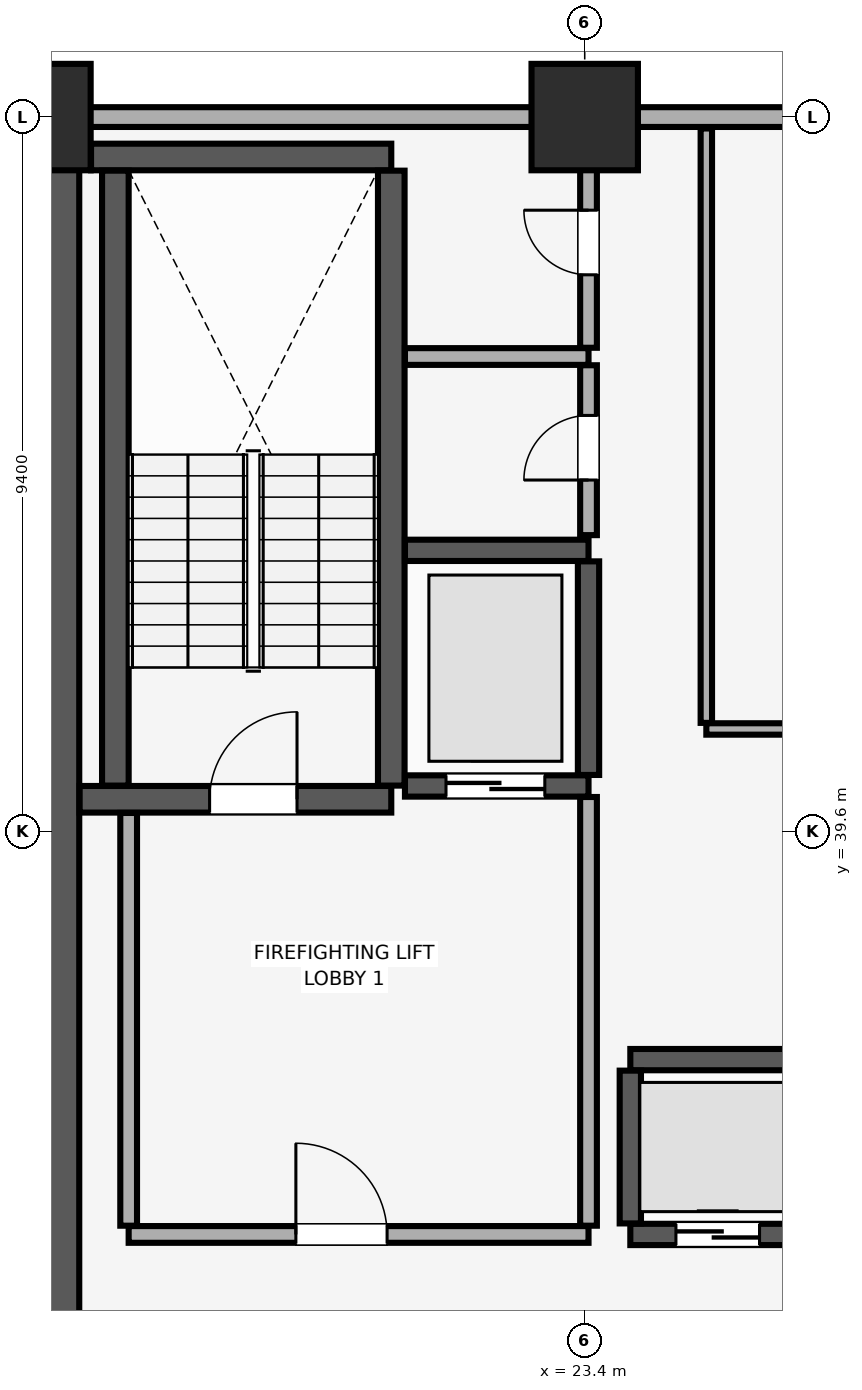
"""IFC4 building model, lengths in metres.
Left out: names, types, materials, properties, quantities, classifications, styles, units other than length and angle.
Written with IfcOpenShell. Run it as: python <this file> out.ifc"""

import sys

from ifc_helpers import new_model, si_unit, direction, frame, frame_2d, origin, origin_2d, place, context, subcontext, project, spatial, rectangle, extrude, element, fill, save


model = new_model("IFC4")
c1 = context("Model", 3, precision=1e-05, world=origin(), true_north=direction((0.0, 1.0)))
c2 = subcontext(c1, "Body", "Model", "MODEL_VIEW")
j1 = project(units=[si_unit("LENGTHUNIT", "METRE"), si_unit("PLANEANGLEUNIT", "RADIAN")], contexts=[c1])
p1 = place(None, origin())
s1 = spatial("IfcSite", under=j1, at=p1, CompositionType="ELEMENT")
p2 = place(p1, origin())
s2 = spatial("IfcBuilding", under=s1, at=p2, CompositionType="ELEMENT")
p3 = place(p2, frame((0.0, 0.0, 35.15)))
s3 = spatial("IfcBuildingStorey", under=s2, at=p3, CompositionType="ELEMENT", Elevation=35.15)
for number, where, z_axis, x_axis in (
    (1, (16.2, 49.0, 0.0), (0.0, 0.0, 1.0), (1.0, 0.0, 0.0)),
    (2, (23.4, 49.0, 0.0), (0.0, 0.0, 1.0), (1.0, 0.0, 0.0)),
):
    element("IfcColumn", number, at=place(p3, frame(where, z_axis=z_axis, x_axis=x_axis)), inside=s3, PredefinedType="COLUMN", context=c2, shape_type="SweptSolid", body=[
        extrude(rectangle(XDim=1.4, YDim=1.4, at=origin_2d()), origin(), (0.0, 0.0, 1.0), 3.51),
    ])
p4 = place(p3, frame((79.8, 49.0, 0.0), z_axis=(0.0, 0.0, 1.0), x_axis=(-1.0, 0.0, 0.0)))
e3 = element("IfcWall", 3, at=p4, inside=s3, PredefinedType="SOLIDWALL", context=c2, shape_type="SweptSolid", body=[
    extrude(rectangle(XDim=75.6, YDim=0.26, at=frame_2d((37.8, 0.0))), origin(), (0.0, 0.0, 1.0), 2.56),
])
p5 = place(p4, frame((72.565, 0.0, 0.85)))
e4 = element("IfcOpeningElement", 4, at=p5, cuts=e3, PredefinedType="OPENING", context=c2, shape_type="SweptSolid", body=[
    extrude(rectangle(XDim=1.5, YDim=1.4, at=frame_2d((0.75, 0.7))), frame((0.0, 0.14, 0.0), z_axis=(0.0, -1.0, 0.0), x_axis=(1.0, 0.0, 0.0)), (0.0, 0.0, 1.0), 0.28),
])
p6 = place(p4, frame((67.45, 0.0, 0.85)))
e5 = element("IfcOpeningElement", 5, at=p6, cuts=e3, PredefinedType="OPENING", context=c2, shape_type="SweptSolid", body=[
    extrude(rectangle(XDim=1.5, YDim=1.4, at=frame_2d((0.75, 0.7))), frame((0.0, 0.14, 0.0), z_axis=(0.0, -1.0, 0.0), x_axis=(1.0, 0.0, 0.0)), (0.0, 0.0, 1.0), 0.28),
])
p7 = place(p4, frame((6.65, 0.0, 0.85)))
e6 = element("IfcOpeningElement", 6, at=p7, cuts=e3, PredefinedType="OPENING", context=c2, shape_type="SweptSolid", body=[
    extrude(rectangle(XDim=1.5, YDim=1.4, at=frame_2d((0.75, 0.7))), frame((0.0, 0.14, 0.0), z_axis=(0.0, -1.0, 0.0), x_axis=(1.0, 0.0, 0.0)), (0.0, 0.0, 1.0), 0.28),
])
p8 = place(p4, frame((1.535, 0.0, 0.85)))
e7 = element("IfcOpeningElement", 7, at=p8, cuts=e3, PredefinedType="OPENING", context=c2, shape_type="SweptSolid", body=[
    extrude(rectangle(XDim=1.5, YDim=1.4, at=frame_2d((0.75, 0.7))), frame((0.0, 0.14, 0.0), z_axis=(0.0, -1.0, 0.0), x_axis=(1.0, 0.0, 0.0)), (0.0, 0.0, 1.0), 0.28),
])
p9 = place(p4, frame((51.365, 0.0, 0.9)))
e8 = element("IfcOpeningElement", 8, at=p9, cuts=e3, PredefinedType="OPENING", context=c2, shape_type="SweptSolid", body=[
    extrude(rectangle(XDim=1.5, YDim=1.4, at=frame_2d((0.75, 0.7))), frame((0.0, 0.14, 0.0), z_axis=(0.0, -1.0, 0.0), x_axis=(1.0, 0.0, 0.0)), (0.0, 0.0, 1.0), 0.28),
])
p10 = place(p4, frame((46.0, 0.0, 0.9)))
e9 = element("IfcOpeningElement", 9, at=p10, cuts=e3, PredefinedType="OPENING", context=c2, shape_type="SweptSolid", body=[
    extrude(rectangle(XDim=1.5, YDim=1.4, at=frame_2d((0.75, 0.7))), frame((0.0, 0.14, 0.0), z_axis=(0.0, -1.0, 0.0), x_axis=(1.0, 0.0, 0.0)), (0.0, 0.0, 1.0), 0.28),
])
p11 = place(p4, frame((29.15, 0.0, 0.9)))
e10 = element("IfcOpeningElement", 10, at=p11, cuts=e3, PredefinedType="OPENING", context=c2, shape_type="SweptSolid", body=[
    extrude(rectangle(XDim=1.5, YDim=1.4, at=frame_2d((0.75, 0.7))), frame((0.0, 0.14, 0.0), z_axis=(0.0, -1.0, 0.0), x_axis=(1.0, 0.0, 0.0)), (0.0, 0.0, 1.0), 0.28),
])
p12 = place(p4, frame((23.485, 0.0, 0.9)))
e11 = element("IfcOpeningElement", 11, at=p12, cuts=e3, PredefinedType="OPENING", context=c2, shape_type="SweptSolid", body=[
    extrude(rectangle(XDim=1.5, YDim=1.4, at=frame_2d((0.75, 0.7))), frame((0.0, 0.14, 0.0), z_axis=(0.0, -1.0, 0.0), x_axis=(1.0, 0.0, 0.0)), (0.0, 0.0, 1.0), 0.28),
])
p13 = place(p3, frame((16.2, 29.4, 0.0), z_axis=(0.0, 0.0, 1.0), x_axis=(0.0, 1.0, 0.0)))
e12 = element("IfcWall", 12, at=p13, inside=s3, PredefinedType="SHEAR", context=c2, shape_type="SweptSolid", body=[
    extrude(rectangle(XDim=19.2, YDim=1.1, at=frame_2d((9.6, 0.0))), origin(), (0.0, 0.0, 1.0), 3.51),
])
p14 = place(p3, frame((16.755, 40.025, 0.0), z_axis=(0.0, 0.0, 1.0), x_axis=(1.0, 0.0, 0.0)))
e13 = element("IfcWall", 13, at=p14, inside=s3, PredefinedType="SHEAR", context=c2, shape_type="SweptSolid", body=[
    extrude(rectangle(XDim=4.1, YDim=0.35, at=frame_2d((2.05, 0.0))), origin(), (0.0, 0.0, 1.0), 3.51),
])
p15 = place(p14, frame((1.71, 0.0, 0.0)))
e14 = element("IfcOpeningElement", 14, at=p15, cuts=e13, PredefinedType="OPENING", context=c2, shape_type="SweptSolid", body=[
    extrude(rectangle(XDim=1.15, YDim=2.15, at=frame_2d((0.575, 1.075))), frame((0.0, 0.185, 0.0), z_axis=(0.0, -1.0, 0.0), x_axis=(1.0, 0.0, 0.0)), (0.0, 0.0, 1.0), 0.37),
])
p16 = place(p3, frame((16.905, 48.475, 0.0), z_axis=(0.0, 0.0, 1.0), x_axis=(1.0, 0.0, 0.0)))
e15 = element("IfcWall", 15, at=p16, inside=s3, PredefinedType="SHEAR", context=c2, shape_type="SweptSolid", body=[
    extrude(rectangle(XDim=3.95, YDim=0.35, at=frame_2d((1.975, 0.0))), origin(), (0.0, 0.0, 1.0), 3.51),
])
for number, where, z_axis, x_axis in (
    (16, (17.225, 40.205, 0.0), (0.0, 0.0, 1.0), (0.0, 1.0, 0.0)),
    (17, (20.855, 40.205, 0.0), (0.0, 0.0, 1.0), (0.0, 1.0, 0.0)),
):
    element("IfcWall", number, at=place(p3, frame(where, z_axis=z_axis, x_axis=x_axis)), inside=s3, PredefinedType="SHEAR", context=c2, shape_type="SweptSolid", body=[
        extrude(rectangle(XDim=8.09, YDim=0.35, at=frame_2d((4.045, 0.0))), origin(), (0.0, 0.0, 1.0), 3.51),
    ])
p17 = place(p3, frame((24.0, 34.3, 0.0), z_axis=(0.0, 0.0, 1.0), x_axis=(1.0, 0.0, 0.0)))
e18 = element("IfcWall", 18, at=p17, inside=s3, PredefinedType="SHEAR", context=c2, shape_type="SweptSolid", body=[
    extrude(rectangle(XDim=2.3, YDim=0.28, at=frame_2d((1.15, 0.0))), origin(), (0.0, 0.0, 1.0), 3.51),
])
p18 = place(p17, frame((0.6, 0.0, 0.0)))
e19 = element("IfcOpeningElement", 19, at=p18, cuts=e18, PredefinedType="OPENING", context=c2, shape_type="SweptSolid", body=[
    extrude(rectangle(XDim=1.1, YDim=2.2, at=frame_2d((0.55, 1.1))), frame((0.0, 0.15, 0.0), z_axis=(0.0, -1.0, 0.0), x_axis=(1.0, 0.0, 0.0)), (0.0, 0.0, 1.0), 0.3),
])
p19 = place(p3, frame((24.0, 36.6, 0.0), z_axis=(0.0, 0.0, 1.0), x_axis=(1.0, 0.0, 0.0)))
e20 = element("IfcWall", 20, at=p19, inside=s3, PredefinedType="SHEAR", context=c2, shape_type="SweptSolid", body=[
    extrude(rectangle(XDim=2.3, YDim=0.28, at=frame_2d((1.15, 0.0))), origin(), (0.0, 0.0, 1.0), 3.51),
])
p20 = place(p3, frame((24.0, 34.445, 0.0), z_axis=(0.0, 0.0, 1.0), x_axis=(0.0, 1.0, 0.0)))
e21 = element("IfcWall", 21, at=p20, inside=s3, PredefinedType="SHEAR", context=c2, shape_type="SweptSolid", body=[
    extrude(rectangle(XDim=2.01, YDim=0.28, at=frame_2d((1.005, 0.0))), origin(), (0.0, 0.0, 1.0), 3.51),
])
p21 = place(p3, frame((21.035, 40.2, 0.0), z_axis=(0.0, 0.0, 1.0), x_axis=(1.0, 0.0, 0.0)))
e22 = element("IfcWall", 22, at=p21, inside=s3, PredefinedType="SHEAR", context=c2, shape_type="SweptSolid", body=[
    extrude(rectangle(XDim=2.415, YDim=0.28, at=frame_2d((1.208, 0.0))), origin(), (0.0, 0.0, 1.0), 3.51),
])
p22 = place(p21, frame((0.54, 0.0, 0.0)))
e23 = element("IfcOpeningElement", 23, at=p22, cuts=e22, PredefinedType="OPENING", context=c2, shape_type="SweptSolid", body=[
    extrude(rectangle(XDim=1.3, YDim=2.3, at=frame_2d((0.65, 1.15))), frame((0.0, 0.15, 0.0), z_axis=(0.0, -1.0, 0.0), x_axis=(1.0, 0.0, 0.0)), (0.0, 0.0, 1.0), 0.3),
])
p23 = place(p3, frame((21.035, 43.3, 0.0), z_axis=(0.0, 0.0, 1.0), x_axis=(1.0, 0.0, 0.0)))
e24 = element("IfcWall", 24, at=p23, inside=s3, PredefinedType="SHEAR", context=c2, shape_type="SweptSolid", body=[
    extrude(rectangle(XDim=2.415, YDim=0.28, at=frame_2d((1.208, 0.0))), origin(), (0.0, 0.0, 1.0), 3.51),
])
p24 = place(p3, frame((23.45, 40.345, 0.0), z_axis=(0.0, 0.0, 1.0), x_axis=(0.0, 1.0, 0.0)))
e25 = element("IfcWall", 25, at=p24, inside=s3, PredefinedType="SHEAR", context=c2, shape_type="SweptSolid", body=[
    extrude(rectangle(XDim=2.81, YDim=0.28, at=frame_2d((1.405, 0.0))), origin(), (0.0, 0.0, 1.0), 3.51),
])
p25 = place(p3, frame((17.4, 34.3, 0.0), z_axis=(0.0, 0.0, 1.0), x_axis=(1.0, 0.0, 0.0)))
e26 = element("IfcWall", 26, at=p25, inside=s3, PredefinedType="PARTITIONING", context=c2, shape_type="SweptSolid", body=[
    extrude(rectangle(XDim=6.05, YDim=0.22, at=frame_2d((3.025, 0.0))), origin(), (0.0, 0.0, 1.0), 3.51),
])
p26 = place(p25, frame((2.2, 0.0, 0.0)))
e27 = element("IfcOpeningElement", 27, at=p26, cuts=e26, PredefinedType="OPENING", context=c2, shape_type="SweptSolid", body=[
    extrude(rectangle(XDim=1.2, YDim=2.15, at=frame_2d((0.6, 1.075))), frame((0.0, 0.12, 0.0), z_axis=(0.0, -1.0, 0.0), x_axis=(1.0, 0.0, 0.0)), (0.0, 0.0, 1.0), 0.24),
])
p27 = place(p3, frame((17.4, 34.415, 0.0), z_axis=(0.0, 0.0, 1.0), x_axis=(0.0, 1.0, 0.0)))
e28 = element("IfcWall", 28, at=p27, inside=s3, PredefinedType="PARTITIONING", context=c2, shape_type="SweptSolid", body=[
    extrude(rectangle(XDim=5.43, YDim=0.22, at=frame_2d((2.715, 0.0))), origin(), (0.0, 0.0, 1.0), 3.51),
])
p28 = place(p3, frame((23.45, 34.415, 0.0), z_axis=(0.0, 0.0, 1.0), x_axis=(0.0, 1.0, 0.0)))
e29 = element("IfcWall", 29, at=p28, inside=s3, PredefinedType="PARTITIONING", context=c2, shape_type="SweptSolid", body=[
    extrude(rectangle(XDim=5.64, YDim=0.22, at=frame_2d((2.82, 0.0))), origin(), (0.0, 0.0, 1.0), 3.51),
])
p29 = place(p3, frame((21.035, 45.85, 0.0), z_axis=(0.0, 0.0, 1.0), x_axis=(1.0, 0.0, 0.0)))
e30 = element("IfcWall", 30, at=p29, inside=s3, PredefinedType="PARTITIONING", context=c2, shape_type="SweptSolid", body=[
    extrude(rectangle(XDim=2.415, YDim=0.22, at=frame_2d((1.208, 0.0))), origin(), (0.0, 0.0, 1.0), 3.51),
])
p30 = place(p3, frame((23.45, 43.5, 0.0), z_axis=(0.0, 0.0, 1.0), x_axis=(0.0, 1.0, 0.0)))
e31 = element("IfcWall", 31, at=p30, inside=s3, PredefinedType="PARTITIONING", context=c2, shape_type="SweptSolid", body=[
    extrude(rectangle(XDim=2.235, YDim=0.22, at=frame_2d((1.118, 0.0))), origin(), (0.0, 0.0, 1.0), 3.51),
])
p31 = place(p30, frame((0.725, 0.0, 0.0)))
e32 = element("IfcOpeningElement", 32, at=p31, cuts=e31, PredefinedType="OPENING", context=c2, shape_type="SweptSolid", body=[
    extrude(rectangle(XDim=0.85, YDim=2.1, at=frame_2d((0.425, 1.05))), frame((0.0, 0.12, 0.0), z_axis=(0.0, -1.0, 0.0), x_axis=(1.0, 0.0, 0.0)), (0.0, 0.0, 1.0), 0.24),
])
p32 = place(p3, frame((23.45, 45.965, 0.0), z_axis=(0.0, 0.0, 1.0), x_axis=(0.0, 1.0, 0.0)))
e33 = element("IfcWall", 33, at=p32, inside=s3, PredefinedType="PARTITIONING", context=c2, shape_type="SweptSolid", body=[
    extrude(rectangle(XDim=2.885, YDim=0.22, at=frame_2d((1.442, 0.0))), origin(), (0.0, 0.0, 1.0), 3.51),
])
p33 = place(p32, frame((0.96, 0.0, 0.0)))
e34 = element("IfcOpeningElement", 34, at=p33, cuts=e33, PredefinedType="OPENING", context=c2, shape_type="SweptSolid", body=[
    extrude(rectangle(XDim=0.85, YDim=2.1, at=frame_2d((0.425, 1.05))), frame((0.0, 0.12, 0.0), z_axis=(0.0, -1.0, 0.0), x_axis=(1.0, 0.0, 0.0)), (0.0, 0.0, 1.0), 0.24),
])
p34 = place(p3, frame((25.0, 40.95, 0.0), z_axis=(0.0, 0.0, 1.0), x_axis=(1.0, 0.0, 0.0)))
e35 = element("IfcWall", 35, at=p34, inside=s3, PredefinedType="PARTITIONING", context=c2, shape_type="SweptSolid", body=[
    extrude(rectangle(XDim=5.2, YDim=0.15, at=frame_2d((2.6, 0.0))), origin(), (0.0, 0.0, 1.0), 3.51),
])
p35 = place(p34, frame((2.175, 0.0, 0.0)))
e36 = element("IfcOpeningElement", 36, at=p35, cuts=e35, PredefinedType="OPENING", context=c2, shape_type="SweptSolid", body=[
    extrude(rectangle(XDim=0.85, YDim=2.1, at=frame_2d((0.425, 1.05))), frame((0.0, 0.085, 0.0), z_axis=(0.0, -1.0, 0.0), x_axis=(1.0, 0.0, 0.0)), (0.0, 0.0, 1.0), 0.17),
])
p36 = place(p3, frame((25.0, 41.03, 0.0), z_axis=(0.0, 0.0, 1.0), x_axis=(0.0, 1.0, 0.0)))
e37 = element("IfcWall", 37, at=p36, inside=s3, PredefinedType="PARTITIONING", context=c2, shape_type="SweptSolid", body=[
    extrude(rectangle(XDim=7.82, YDim=0.15, at=frame_2d((3.91, 0.0))), origin(), (0.0, 0.0, 1.0), 3.51),
])
p37 = place(p15, origin())
e38 = element("IfcDoor", 38, at=p37, inside=s3, OperationType="SINGLE_SWING_RIGHT", PredefinedType="DOOR", context=c2, shape_type="SweptSolid", body=[
    extrude(rectangle(XDim=1.15, YDim=2.15, at=frame_2d((0.575, 1.075))), frame((0.0, 0.025, 0.0), z_axis=(0.0, -1.0, 0.0), x_axis=(1.0, 0.0, 0.0)), (0.0, 0.0, 1.0), 0.05),
])
fill(e14, e38)
p38 = place(p18, origin())
e39 = element("IfcDoor", 39, at=p38, inside=s3, OperationType="DOUBLE_DOOR_SLIDING", PredefinedType="DOOR", context=c2, shape_type="SweptSolid", body=[
    extrude(rectangle(XDim=1.1, YDim=2.2, at=frame_2d((0.55, 1.1))), frame((0.0, 0.025, 0.0), z_axis=(0.0, -1.0, 0.0), x_axis=(1.0, 0.0, 0.0)), (0.0, 0.0, 1.0), 0.05),
])
fill(e19, e39)
p39 = place(p22, origin())
e40 = element("IfcDoor", 40, at=p39, inside=s3, OperationType="DOUBLE_DOOR_SLIDING", PredefinedType="DOOR", context=c2, shape_type="SweptSolid", body=[
    extrude(rectangle(XDim=1.3, YDim=2.3, at=frame_2d((0.65, 1.15))), frame((0.0, 0.025, 0.0), z_axis=(0.0, -1.0, 0.0), x_axis=(1.0, 0.0, 0.0)), (0.0, 0.0, 1.0), 0.05),
])
fill(e23, e40)
p40 = place(p26, origin())
e41 = element("IfcDoor", 41, at=p40, inside=s3, OperationType="SINGLE_SWING_LEFT", PredefinedType="DOOR", context=c2, shape_type="SweptSolid", body=[
    extrude(rectangle(XDim=1.2, YDim=2.15, at=frame_2d((0.6, 1.075))), frame((0.0, 0.025, 0.0), z_axis=(0.0, -1.0, 0.0), x_axis=(1.0, 0.0, 0.0)), (0.0, 0.0, 1.0), 0.05),
])
fill(e27, e41)
p41 = place(p31, origin())
e42 = element("IfcDoor", 42, at=p41, inside=s3, OperationType="SINGLE_SWING_LEFT", PredefinedType="DOOR", context=c2, shape_type="SweptSolid", body=[
    extrude(rectangle(XDim=0.85, YDim=2.1, at=frame_2d((0.425, 1.05))), frame((0.0, 0.025, 0.0), z_axis=(0.0, -1.0, 0.0), x_axis=(1.0, 0.0, 0.0)), (0.0, 0.0, 1.0), 0.05),
])
fill(e32, e42)
p42 = place(p33, origin())
e43 = element("IfcDoor", 43, at=p42, inside=s3, OperationType="SINGLE_SWING_RIGHT", PredefinedType="DOOR", context=c2, shape_type="SweptSolid", body=[
    extrude(rectangle(XDim=0.85, YDim=2.1, at=frame_2d((0.425, 1.05))), frame((0.0, 0.025, 0.0), z_axis=(0.0, -1.0, 0.0), x_axis=(1.0, 0.0, 0.0)), (0.0, 0.0, 1.0), 0.05),
])
fill(e34, e43)
save(model, sys.argv[1])
